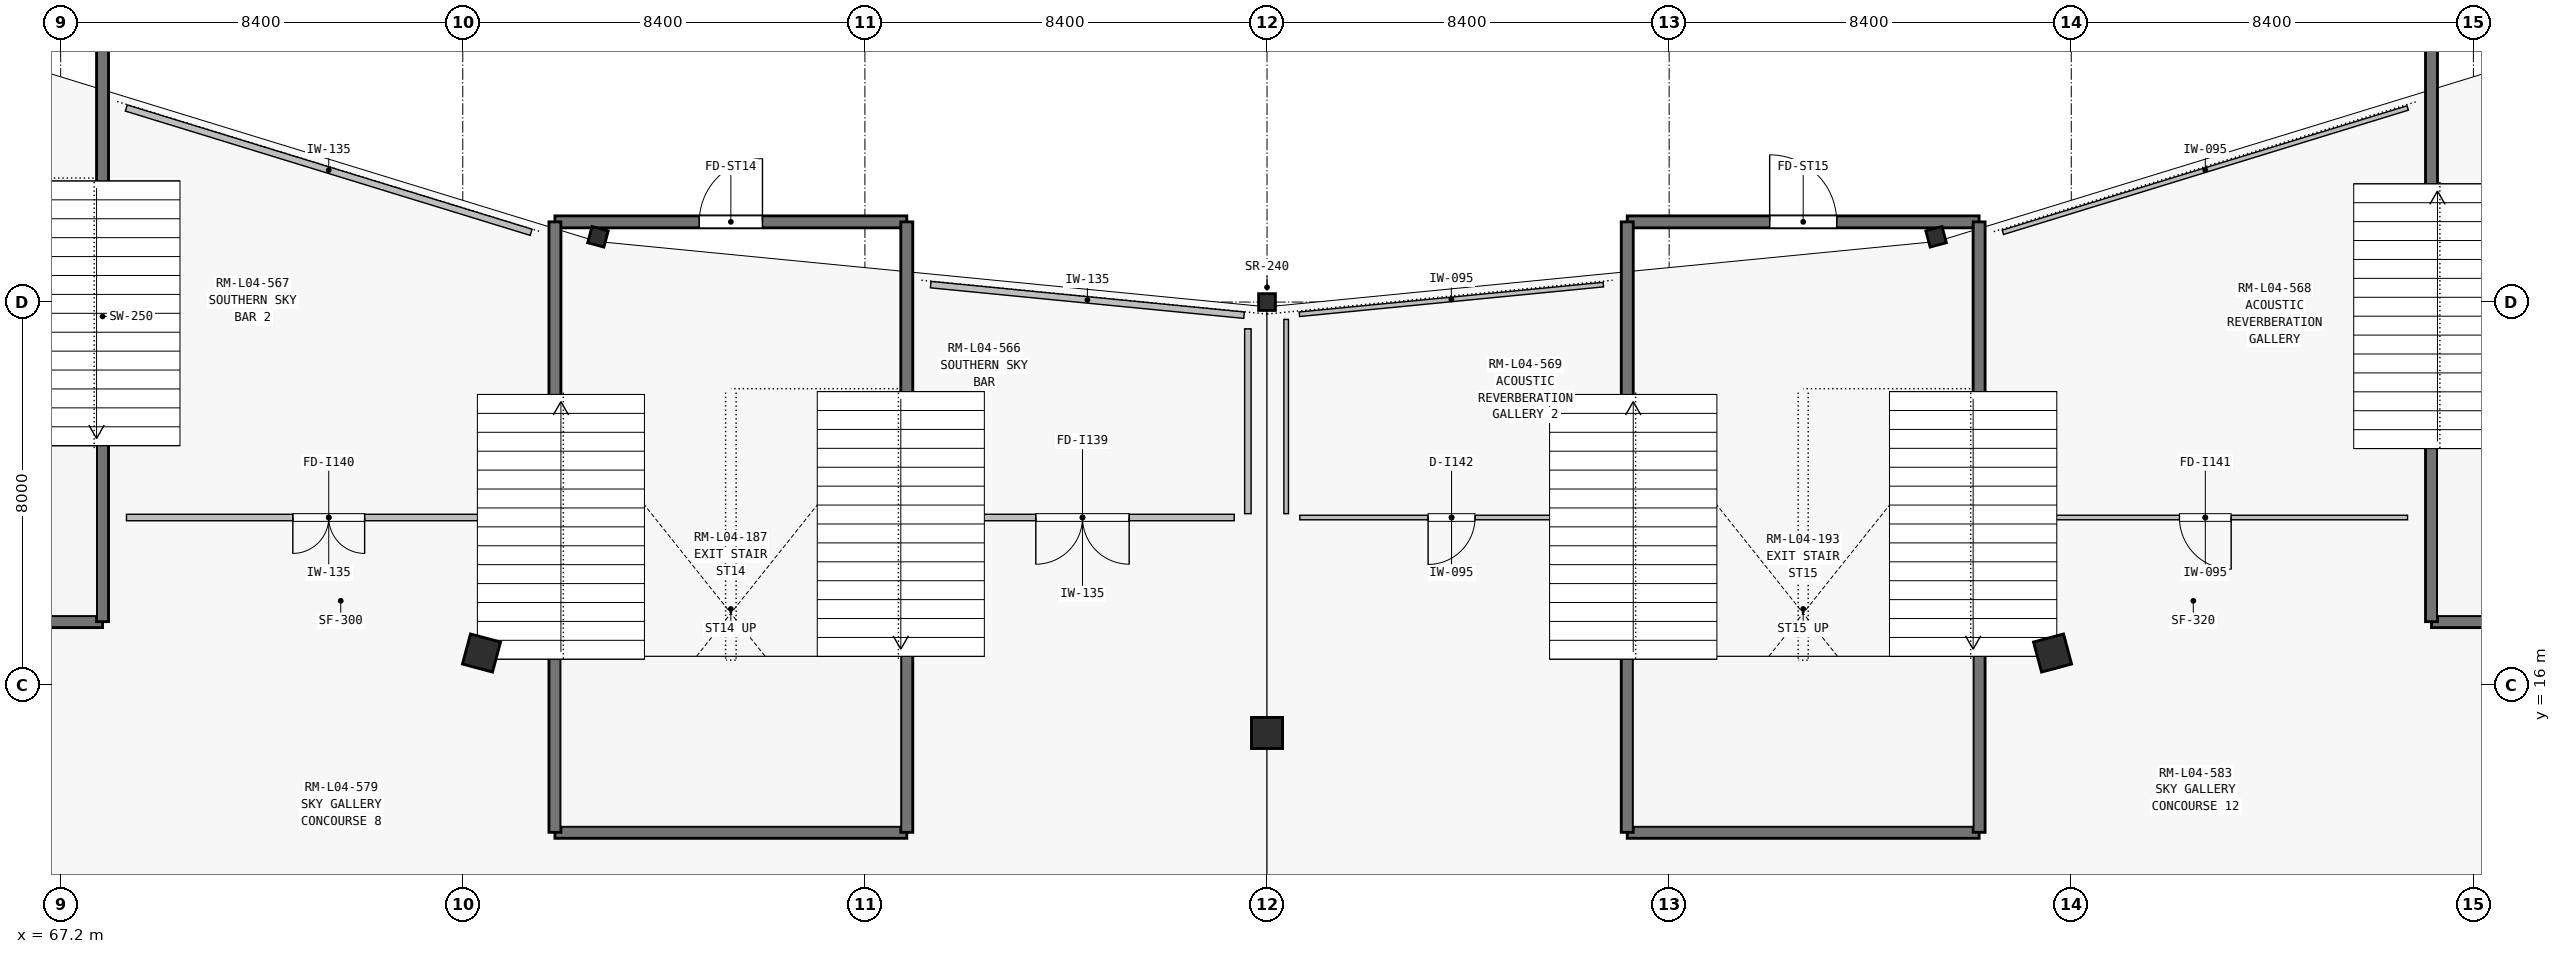
"""IFC4 building model, lengths in metres.
Left out: names, types, materials, properties, quantities, classifications, styles, units other than length and angle.
Written with IfcOpenShell. Run it as: python <this file> out.ifc"""

import sys

from ifc_helpers import new_model, si_unit, direction, frame, frame_2d, origin, origin_2d, place, context, subcontext, project, spatial, rectangle, i_section, extrude, element, fill, save


model = new_model("IFC4")
c1 = context("Model", 3, precision=1e-05, world=origin(), true_north=direction((0.0, 1.0)))
c2 = subcontext(c1, "Body", "Model", "MODEL_VIEW")
j1 = project(units=[si_unit("LENGTHUNIT", "METRE"), si_unit("PLANEANGLEUNIT", "RADIAN")], contexts=[c1])
p1 = place(None, origin())
s1 = spatial("IfcSite", under=j1, at=p1, CompositionType="ELEMENT")
p2 = place(p1, origin())
s2 = spatial("IfcBuilding", under=s1, at=p2, CompositionType="ELEMENT")
p3 = place(p2, frame((0.0, 0.0, 18.9)))
s3 = spatial("IfcBuildingStorey", under=s2, at=p3, CompositionType="ELEMENT", Elevation=18.9)
for number, where, z_axis, x_axis in (
    (1, (78.424, 25.363, 0.0), (0.0, 0.0, 1.0), (-0.259, -0.966, 0.0)),
    (2, (92.4, 24.0, 0.0), (0.0, 0.0, 1.0), (0.0, -1.0, 0.0)),
    (3, (106.376, 25.363, 0.0), (0.0, 0.0, 1.0), (0.259, -0.966, 0.0)),
):
    element("IfcColumn", number, at=place(p3, frame(where, z_axis=z_axis, x_axis=x_axis)), inside=s3, PredefinedType="COLUMN", context=c2, shape_type="SweptSolid", body=[
        extrude(i_section(OverallWidth=0.35, OverallDepth=0.35, WebThickness=0.014, FlangeThickness=0.024, at=origin_2d()), origin(), (0.0, 0.0, 1.0), 4.5),
    ])
for number, where, z_axis, x_axis in (
    (4, (75.991, 16.67, 0.0), (0.0, 0.0, 1.0), (-0.259, -0.966, 0.0)),
    (5, (92.4, 15.0, 0.0), (0.0, 0.0, 1.0), (0.0, -1.0, 0.0)),
    (6, (108.809, 16.67, 0.0), (0.0, 0.0, 1.0), (0.259, -0.966, 0.0)),
):
    element("IfcColumn", number, at=place(p3, frame(where, z_axis=z_axis, x_axis=x_axis)), inside=s3, PredefinedType="COLUMN", context=c2, shape_type="SweptSolid", body=[
        extrude(rectangle(XDim=0.65, YDim=0.65, at=origin_2d()), origin(), (0.0, 0.0, 1.0), 4.5),
    ])
p4 = place(p3, frame((131.7, 12.212, 0.0), z_axis=(0.0, 0.0, 1.0), x_axis=(-0.953759231515, -0.300571669159, 0.0)))
e7 = element("IfcWall", 7, at=p4, inside=s3, PredefinedType="PARAPET", context=c2, shape_type="SweptSolid", body=[
    extrude(rectangle(XDim=19.876, YDim=0.225, at=frame_2d((9.938, 0.0))), origin(), (0.0, 0.0, 1.0), 0.95),
])
p5 = place(p3, frame((60.725, 17.325, 0.0), z_axis=(0.0, 0.0, 1.0), x_axis=(1.0, 0.0, 0.0)))
e8 = element("IfcWall", 8, at=p5, inside=s3, PredefinedType="SHEAR", context=c2, shape_type="SweptSolid", body=[
    extrude(rectangle(XDim=7.35, YDim=0.25, at=frame_2d((3.675, 0.0))), origin(), (0.0, 0.0, 1.0), 4.5),
])
p6 = place(p3, frame((68.075, 17.325, 0.0), z_axis=(0.0, 0.0, 1.0), x_axis=(0.0, 1.0, 0.0)))
e9 = element("IfcWall", 9, at=p6, inside=s3, PredefinedType="SHEAR", context=c2, shape_type="SweptSolid", body=[
    extrude(rectangle(XDim=12.75, YDim=0.25, at=frame_2d((6.375, 0.0))), origin(), (0.0, 0.0, 1.0), 4.5),
])
p7 = place(p3, frame((77.525, 12.925, 0.0), z_axis=(0.0, 0.0, 1.0), x_axis=(1.0, 0.0, 0.0)))
e10 = element("IfcWall", 10, at=p7, inside=s3, PredefinedType="SHEAR", context=c2, shape_type="SweptSolid", body=[
    extrude(rectangle(XDim=7.35, YDim=0.25, at=frame_2d((3.675, 0.0))), origin(), (0.0, 0.0, 1.0), 4.5),
])
p8 = place(p3, frame((77.525, 25.675, 0.0), z_axis=(0.0, 0.0, 1.0), x_axis=(1.0, 0.0, 0.0)))
e11 = element("IfcWall", 11, at=p8, inside=s3, PredefinedType="SHEAR", context=c2, shape_type="SweptSolid", body=[
    extrude(rectangle(XDim=7.35, YDim=0.25, at=frame_2d((3.675, 0.0))), origin(), (0.0, 0.0, 1.0), 4.5),
])
p9 = place(p8, frame((3.015, 0.0, 0.0)))
e12 = element("IfcOpeningElement", 12, at=p9, cuts=e11, PredefinedType="OPENING", context=c2, shape_type="SweptSolid", body=[
    extrude(rectangle(XDim=1.32, YDim=2.2, at=frame_2d((0.66, 1.1))), frame((0.0, 0.135, 0.0), z_axis=(0.0, -1.0, 0.0), x_axis=(1.0, 0.0, 0.0)), (0.0, 0.0, 1.0), 0.27),
])
for number, where, z_axis, x_axis in (
    (13, (77.525, 12.925, 0.0), (0.0, 0.0, 1.0), (0.0, 1.0, 0.0)),
    (14, (84.875, 12.925, 0.0), (0.0, 0.0, 1.0), (0.0, 1.0, 0.0)),
):
    element("IfcWall", number, at=place(p3, frame(where, z_axis=z_axis, x_axis=x_axis)), inside=s3, PredefinedType="SHEAR", context=c2, shape_type="SweptSolid", body=[
        extrude(rectangle(XDim=12.75, YDim=0.25, at=frame_2d((6.375, 0.0))), origin(), (0.0, 0.0, 1.0), 4.5),
    ])
p10 = place(p3, frame((99.925, 12.925, 0.0), z_axis=(0.0, 0.0, 1.0), x_axis=(1.0, 0.0, 0.0)))
e15 = element("IfcWall", 15, at=p10, inside=s3, PredefinedType="SHEAR", context=c2, shape_type="SweptSolid", body=[
    extrude(rectangle(XDim=7.35, YDim=0.25, at=frame_2d((3.675, 0.0))), origin(), (0.0, 0.0, 1.0), 4.5),
])
p11 = place(p3, frame((99.925, 25.675, 0.0), z_axis=(0.0, 0.0, 1.0), x_axis=(1.0, 0.0, 0.0)))
e16 = element("IfcWall", 16, at=p11, inside=s3, PredefinedType="SHEAR", context=c2, shape_type="SweptSolid", body=[
    extrude(rectangle(XDim=7.35, YDim=0.25, at=frame_2d((3.675, 0.0))), origin(), (0.0, 0.0, 1.0), 4.5),
])
p12 = place(p11, frame((2.975, 0.0, 0.0)))
e17 = element("IfcOpeningElement", 17, at=p12, cuts=e16, PredefinedType="OPENING", context=c2, shape_type="SweptSolid", body=[
    extrude(rectangle(XDim=1.4, YDim=2.2, at=frame_2d((0.7, 1.1))), frame((0.0, 0.135, 0.0), z_axis=(0.0, -1.0, 0.0), x_axis=(1.0, 0.0, 0.0)), (0.0, 0.0, 1.0), 0.27),
])
for number, where, z_axis, x_axis in (
    (18, (99.925, 12.925, 0.0), (0.0, 0.0, 1.0), (0.0, 1.0, 0.0)),
    (19, (107.275, 12.925, 0.0), (0.0, 0.0, 1.0), (0.0, 1.0, 0.0)),
):
    element("IfcWall", number, at=place(p3, frame(where, z_axis=z_axis, x_axis=x_axis)), inside=s3, PredefinedType="SHEAR", context=c2, shape_type="SweptSolid", body=[
        extrude(rectangle(XDim=12.75, YDim=0.25, at=frame_2d((6.375, 0.0))), origin(), (0.0, 0.0, 1.0), 4.5),
    ])
p13 = place(p3, frame((116.725, 17.325, 0.0), z_axis=(0.0, 0.0, 1.0), x_axis=(1.0, 0.0, 0.0)))
e20 = element("IfcWall", 20, at=p13, inside=s3, PredefinedType="SHEAR", context=c2, shape_type="SweptSolid", body=[
    extrude(rectangle(XDim=7.35, YDim=0.25, at=frame_2d((3.675, 0.0))), origin(), (0.0, 0.0, 1.0), 4.5),
])
p14 = place(p3, frame((116.725, 17.325, 0.0), z_axis=(0.0, 0.0, 1.0), x_axis=(0.0, 1.0, 0.0)))
e21 = element("IfcWall", 21, at=p14, inside=s3, PredefinedType="SHEAR", context=c2, shape_type="SweptSolid", body=[
    extrude(rectangle(XDim=12.75, YDim=0.25, at=frame_2d((6.375, 0.0))), origin(), (0.0, 0.0, 1.0), 4.5),
])
p15 = place(p3, frame((85.375, 24.365, 0.0), z_axis=(0.0, 0.0, 1.0), x_axis=(0.995273933926, -0.097107139011, 0.0)))
e22 = element("IfcWall", 22, at=p15, inside=s3, PredefinedType="PARTITIONING", context=c2, shape_type="SweptSolid", body=[
    extrude(rectangle(XDim=6.577, YDim=0.135, at=frame_2d((3.289, 0.0))), origin(), (0.0, 0.0, 1.0), 4.21),
])
p16 = place(p3, frame((92.0, 23.441, 0.0), z_axis=(0.0, 0.0, 1.0), x_axis=(0.0, -1.0, 0.0)))
e23 = element("IfcWall", 23, at=p16, inside=s3, PredefinedType="PARTITIONING", context=c2, shape_type="SweptSolid", body=[
    extrude(rectangle(XDim=3.861, YDim=0.135, at=frame_2d((1.93, 0.0))), origin(), (0.0, 0.0, 1.0), 4.21),
])
p17 = place(p3, frame((91.715, 19.5, 0.0), z_axis=(0.0, 0.0, 1.0), x_axis=(-1.0, 0.0, 0.0)))
e24 = element("IfcWall", 24, at=p17, inside=s3, PredefinedType="PARTITIONING", context=c2, shape_type="SweptSolid", body=[
    extrude(rectangle(XDim=6.34, YDim=0.135, at=frame_2d((3.17, 0.0))), origin(), (0.0, 0.0, 1.0), 4.21),
])
p18 = place(p17, frame((2.195, 0.0, 0.0)))
e25 = element("IfcOpeningElement", 25, at=p18, cuts=e24, PredefinedType="OPENING", context=c2, shape_type="SweptSolid", body=[
    extrude(rectangle(XDim=1.95, YDim=2.4, at=frame_2d((0.975, 1.2))), frame((0.0, 0.077, 0.0), z_axis=(0.0, -1.0, 0.0), x_axis=(1.0, 0.0, 0.0)), (0.0, 0.0, 1.0), 0.155),
])
p19 = place(p3, frame((68.572, 28.053, 0.0), z_axis=(0.0, 0.0, 1.0), x_axis=(0.955968559478, -0.293469101082, 0.0)))
e26 = element("IfcWall", 26, at=p19, inside=s3, PredefinedType="PARTITIONING", context=c2, shape_type="SweptSolid", body=[
    extrude(rectangle(XDim=8.847, YDim=0.135, at=frame_2d((4.423, 0.0))), origin(), (0.0, 0.0, 1.0), 4.21),
])
p20 = place(p3, frame((77.025, 19.5, 0.0), z_axis=(0.0, 0.0, 1.0), x_axis=(-1.0, 0.0, 0.0)))
e27 = element("IfcWall", 27, at=p20, inside=s3, PredefinedType="PARTITIONING", context=c2, shape_type="SweptSolid", body=[
    extrude(rectangle(XDim=8.45, YDim=0.135, at=frame_2d((4.225, 0.0))), origin(), (0.0, 0.0, 1.0), 3.779),
])
p21 = place(p20, frame((3.475, 0.0, 0.0)))
e28 = element("IfcOpeningElement", 28, at=p21, cuts=e27, PredefinedType="OPENING", context=c2, shape_type="SweptSolid", body=[
    extrude(rectangle(XDim=1.5, YDim=2.2, at=frame_2d((0.75, 1.1))), frame((0.0, 0.077, 0.0), z_axis=(0.0, -1.0, 0.0), x_axis=(1.0, 0.0, 0.0)), (0.0, 0.0, 1.0), 0.155),
])
p22 = place(p3, frame((107.771, 25.457, 0.0), z_axis=(0.0, 0.0, 1.0), x_axis=(0.955968559478, 0.293469101082, 0.0)))
e29 = element("IfcWall", 29, at=p22, inside=s3, PredefinedType="PARTITIONING", context=c2, shape_type="SweptSolid", body=[
    extrude(rectangle(XDim=8.847, YDim=0.095, at=frame_2d((4.423, 0.0))), origin(), (0.0, 0.0, 1.0), 4.23),
])
p23 = place(p3, frame((116.225, 19.5, 0.0), z_axis=(0.0, 0.0, 1.0), x_axis=(-1.0, 0.0, 0.0)))
e30 = element("IfcWall", 30, at=p23, inside=s3, PredefinedType="PARTITIONING", context=c2, shape_type="SweptSolid", body=[
    extrude(rectangle(XDim=8.45, YDim=0.095, at=frame_2d((4.225, 0.0))), origin(), (0.0, 0.0, 1.0), 3.799),
])
p24 = place(p23, frame((3.685, 0.0, 0.0)))
e31 = element("IfcOpeningElement", 31, at=p24, cuts=e30, PredefinedType="OPENING", context=c2, shape_type="SweptSolid", body=[
    extrude(rectangle(XDim=1.08, YDim=2.15, at=frame_2d((0.54, 1.075))), frame((0.0, 0.057, 0.0), z_axis=(0.0, -1.0, 0.0), x_axis=(1.0, 0.0, 0.0)), (0.0, 0.0, 1.0), 0.115),
])
p25 = place(p3, frame((92.8, 19.58, 0.0), z_axis=(0.0, 0.0, 1.0), x_axis=(0.0, 1.0, 0.0)))
e32 = element("IfcWall", 32, at=p25, inside=s3, PredefinedType="PARTITIONING", context=c2, shape_type="SweptSolid", body=[
    extrude(rectangle(XDim=4.058, YDim=0.095, at=frame_2d((2.029, 0.0))), origin(), (0.0, 0.0, 1.0), 4.23),
])
p26 = place(p3, frame((93.076, 23.745, 0.0), z_axis=(0.0, 0.0, 1.0), x_axis=(0.9952722884, 0.097124002921, 0.0)))
e33 = element("IfcWall", 33, at=p26, inside=s3, PredefinedType="PARTITIONING", context=c2, shape_type="SweptSolid", body=[
    extrude(rectangle(XDim=6.38, YDim=0.095, at=frame_2d((3.19, 0.0))), origin(), (0.0, 0.0, 1.0), 4.23),
])
p27 = place(p3, frame((99.425, 19.5, 0.0), z_axis=(0.0, 0.0, 1.0), x_axis=(-1.0, 0.0, 0.0)))
e34 = element("IfcWall", 34, at=p27, inside=s3, PredefinedType="PARTITIONING", context=c2, shape_type="SweptSolid", body=[
    extrude(rectangle(XDim=6.34, YDim=0.095, at=frame_2d((3.17, 0.0))), origin(), (0.0, 0.0, 1.0), 4.23),
])
p28 = place(p27, frame((2.68, 0.0, 0.0)))
e35 = element("IfcOpeningElement", 35, at=p28, cuts=e34, PredefinedType="OPENING", context=c2, shape_type="SweptSolid", body=[
    extrude(rectangle(XDim=0.98, YDim=2.15, at=frame_2d((0.49, 1.075))), frame((0.0, 0.057, 0.0), z_axis=(0.0, -1.0, 0.0), x_axis=(1.0, 0.0, 0.0)), (0.0, 0.0, 1.0), 0.115),
])
p29 = place(p9, origin())
e36 = element("IfcDoor", 36, at=p29, inside=s3, OperationType="SINGLE_SWING_RIGHT", PredefinedType="DOOR", context=c2, shape_type="SweptSolid", body=[
    extrude(rectangle(XDim=1.32, YDim=2.2, at=frame_2d((0.66, 1.1))), frame((0.0, 0.025, 0.0), z_axis=(0.0, -1.0, 0.0), x_axis=(1.0, 0.0, 0.0)), (0.0, 0.0, 1.0), 0.05),
])
fill(e12, e36)
p30 = place(p12, origin())
e37 = element("IfcDoor", 37, at=p30, inside=s3, OperationType="SINGLE_SWING_LEFT", PredefinedType="DOOR", context=c2, shape_type="SweptSolid", body=[
    extrude(rectangle(XDim=1.4, YDim=2.2, at=frame_2d((0.7, 1.1))), frame((0.0, 0.025, 0.0), z_axis=(0.0, -1.0, 0.0), x_axis=(1.0, 0.0, 0.0)), (0.0, 0.0, 1.0), 0.05),
])
fill(e17, e37)
p31 = place(p18, origin())
e38 = element("IfcDoor", 38, at=p31, inside=s3, OperationType="DOUBLE_DOOR_SINGLE_SWING", PredefinedType="DOOR", context=c2, shape_type="SweptSolid", body=[
    extrude(rectangle(XDim=1.95, YDim=2.4, at=frame_2d((0.975, 1.2))), frame((0.0, 0.025, 0.0), z_axis=(0.0, -1.0, 0.0), x_axis=(1.0, 0.0, 0.0)), (0.0, 0.0, 1.0), 0.05),
])
fill(e25, e38)
p32 = place(p21, origin())
e39 = element("IfcDoor", 39, at=p32, inside=s3, OperationType="DOUBLE_DOOR_SINGLE_SWING", PredefinedType="DOOR", context=c2, shape_type="SweptSolid", body=[
    extrude(rectangle(XDim=1.5, YDim=2.2, at=frame_2d((0.75, 1.1))), frame((0.0, 0.025, 0.0), z_axis=(0.0, -1.0, 0.0), x_axis=(1.0, 0.0, 0.0)), (0.0, 0.0, 1.0), 0.05),
])
fill(e28, e39)
p33 = place(p24, origin())
e40 = element("IfcDoor", 40, at=p33, inside=s3, OperationType="SINGLE_SWING_LEFT", PredefinedType="DOOR", context=c2, shape_type="SweptSolid", body=[
    extrude(rectangle(XDim=1.08, YDim=2.15, at=frame_2d((0.54, 1.075))), frame((0.0, 0.025, 0.0), z_axis=(0.0, -1.0, 0.0), x_axis=(1.0, 0.0, 0.0)), (0.0, 0.0, 1.0), 0.05),
])
fill(e31, e40)
p34 = place(p28, origin())
e41 = element("IfcDoor", 41, at=p34, inside=s3, OperationType="SINGLE_SWING_RIGHT", PredefinedType="DOOR", context=c2, shape_type="SweptSolid", body=[
    extrude(rectangle(XDim=0.98, YDim=2.15, at=frame_2d((0.49, 1.075))), frame((0.0, 0.025, 0.0), z_axis=(0.0, -1.0, 0.0), x_axis=(1.0, 0.0, 0.0)), (0.0, 0.0, 1.0), 0.05),
])
fill(e35, e41)
save(model, sys.argv[1])
